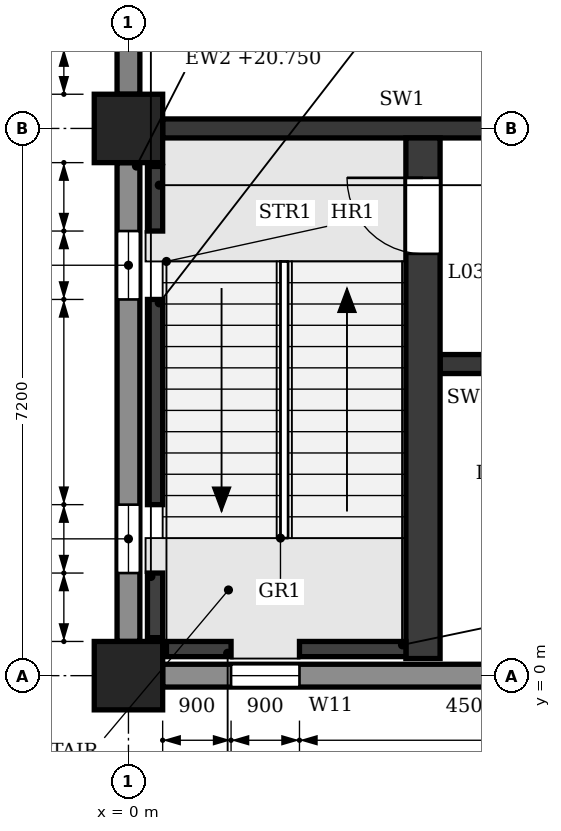
"""IFC4 building model, lengths in metres.
Left out: names, types, materials, properties, quantities, classifications, styles, units other than length and angle.
Written with IfcOpenShell. Run it as: python <this file> out.ifc"""

import sys

from ifc_helpers import new_model, si_unit, direction, frame, frame_2d, origin, origin_2d, place, context, subcontext, project, spatial, polyline, rectangle, outline, extrude, element, fill, save


model = new_model("IFC4")
c1 = context("Model", 3, precision=1e-05, world=origin(), true_north=direction((0.0, 1.0)))
c2 = subcontext(c1, "Body", "Model", "MODEL_VIEW")
j1 = project(units=[si_unit("LENGTHUNIT", "METRE"), si_unit("PLANEANGLEUNIT", "RADIAN")], contexts=[c1])
p1 = place(None, origin())
s1 = spatial("IfcSite", under=j1, at=p1, CompositionType="ELEMENT")
p2 = place(p1, origin())
s2 = spatial("IfcBuilding", under=s1, at=p2, CompositionType="ELEMENT")
p3 = place(p2, frame((0.0, 0.0, 16.8)))
s3 = spatial("IfcBuildingStorey", under=s2, at=p3, CompositionType="ELEMENT", Elevation=16.8)
for number, where, z_axis, x_axis in (
    (1, (0.0, 0.0, 0.0), (0.0, 0.0, 1.0), (1.0, 0.0, 0.0)),
    (2, (0.0, 7.2, 0.0), (0.0, 0.0, 1.0), (1.0, 0.0, 0.0)),
):
    element("IfcColumn", number, at=place(p3, frame(where, z_axis=z_axis, x_axis=x_axis)), inside=s3, PredefinedType="COLUMN", context=c2, shape_type="SweptSolid", body=[
        extrude(rectangle(XDim=0.9, YDim=0.9, at=origin_2d()), origin(), (0.0, 0.0, 1.0), 4.8),
    ])
p4 = place(p3, frame((0.0, 0.45, 0.0), z_axis=(0.0, 0.0, 1.0), x_axis=(0.0, 1.0, 0.0)))
e3 = element("IfcWall", 3, at=p4, inside=s3, PredefinedType="STANDARD", context=c2, shape_type="SweptSolid", body=[
    extrude(rectangle(XDim=6.3, YDim=0.3, at=frame_2d((3.15, 0.0))), origin(), (0.0, 0.0, 1.0), 3.95),
])
p5 = place(p4, frame((0.9, 0.0, 0.9)))
e4 = element("IfcOpeningElement", 4, at=p5, cuts=e3, PredefinedType="OPENING", context=c2, shape_type="SweptSolid", body=[
    extrude(outline(polyline([(0.0, 0.0), (0.9, 0.0), (0.9, 2.05), (0.45, 2.5), (0.0, 2.05), (0.0, 0.0)])), frame((0.0, 0.16, 0.0), z_axis=(0.0, -1.0, 0.0), x_axis=(1.0, 0.0, 0.0)), (0.0, 0.0, 1.0), 0.32),
])
p6 = place(p4, frame((4.5, 0.0, 0.9)))
e5 = element("IfcOpeningElement", 5, at=p6, cuts=e3, PredefinedType="OPENING", context=c2, shape_type="SweptSolid", body=[
    extrude(outline(polyline([(0.0, 0.0), (0.9, 0.0), (0.9, 2.05), (0.45, 2.5), (0.0, 2.05), (0.0, 0.0)])), frame((0.0, 0.16, 0.0), z_axis=(0.0, -1.0, 0.0), x_axis=(1.0, 0.0, 0.0)), (0.0, 0.0, 1.0), 0.32),
])
p7 = place(p3, frame((0.0, 7.65, 0.0), z_axis=(0.0, 0.0, 1.0), x_axis=(0.0, 1.0, 0.0)))
e6 = element("IfcWall", 6, at=p7, inside=s3, PredefinedType="STANDARD", context=c2, shape_type="SweptSolid", body=[
    extrude(rectangle(XDim=6.3, YDim=0.3, at=frame_2d((3.15, 0.0))), origin(), (0.0, 0.0, 1.0), 3.95),
])
p8 = place(p7, frame((0.6, 0.0, 0.9)))
e7 = element("IfcOpeningElement", 7, at=p8, cuts=e6, PredefinedType="OPENING", context=c2, shape_type="SweptSolid", body=[
    extrude(outline(polyline([(0.0, 0.0), (1.5, 0.0), (1.5, 1.75), (0.75, 2.5), (0.0, 1.75), (0.0, 0.0)])), frame((0.0, 0.16, 0.0), z_axis=(0.0, -1.0, 0.0), x_axis=(1.0, 0.0, 0.0)), (0.0, 0.0, 1.0), 0.32),
])
p9 = place(p7, frame((4.2, 0.0, 0.9)))
e8 = element("IfcOpeningElement", 8, at=p9, cuts=e6, PredefinedType="OPENING", context=c2, shape_type="SweptSolid", body=[
    extrude(outline(polyline([(0.0, 0.0), (1.5, 0.0), (1.5, 1.75), (0.75, 2.5), (0.0, 1.75), (0.0, 0.0)])), frame((0.0, 0.16, 0.0), z_axis=(0.0, -1.0, 0.0), x_axis=(1.0, 0.0, 0.0)), (0.0, 0.0, 1.0), 0.32),
])
p10 = place(p3, frame((0.45, 0.0, 0.0), z_axis=(0.0, 0.0, 1.0), x_axis=(1.0, 0.0, 0.0)))
e9 = element("IfcWall", 9, at=p10, inside=s3, PredefinedType="STANDARD", context=c2, shape_type="SweptSolid", body=[
    extrude(rectangle(XDim=6.3, YDim=0.3, at=frame_2d((3.15, 0.0))), origin(), (0.0, 0.0, 1.0), 3.95),
])
p11 = place(p10, frame((0.9, 0.0, 0.9)))
e10 = element("IfcOpeningElement", 10, at=p11, cuts=e9, PredefinedType="OPENING", context=c2, shape_type="SweptSolid", body=[
    extrude(outline(polyline([(0.0, 0.0), (0.9, 0.0), (0.9, 2.05), (0.45, 2.5), (0.0, 2.05), (0.0, 0.0)])), frame((0.0, 0.16, 0.0), z_axis=(0.0, -1.0, 0.0), x_axis=(1.0, 0.0, 0.0)), (0.0, 0.0, 1.0), 0.32),
])
p12 = place(p3, frame((0.45, 7.2, 0.0), z_axis=(0.0, 0.0, 1.0), x_axis=(1.0, 0.0, 0.0)))
e11 = element("IfcWall", 11, at=p12, inside=s3, PredefinedType="SHEAR", context=c2, shape_type="SweptSolid", body=[
    extrude(rectangle(XDim=6.3, YDim=0.25, at=frame_2d((3.15, 0.0))), origin(), (0.0, 0.0, 1.0), 3.8),
])
p13 = place(p12, frame((4.8, 0.0, 0.0)))
e12 = element("IfcOpeningElement", 12, at=p13, cuts=e11, PredefinedType="OPENING", context=c2, shape_type="SweptSolid", body=[
    extrude(rectangle(XDim=1.1, YDim=2.1, at=frame_2d((0.55, 1.05))), frame((0.0, 0.135, 0.0), z_axis=(0.0, -1.0, 0.0), x_axis=(1.0, 0.0, 0.0)), (0.0, 0.0, 1.0), 0.27),
])
p14 = place(p3, frame((0.35, 0.5, -0.25), z_axis=(0.0, 0.0, 1.0), x_axis=(0.0, 1.0, 0.0)))
e13 = element("IfcWall", 13, at=p14, inside=s3, PredefinedType="SHEAR", context=c2, shape_type="SweptSolid", body=[
    extrude(rectangle(XDim=0.85, YDim=0.2, at=frame_2d((0.425, 0.0))), origin(), (0.0, 0.0, 1.0), 4.8),
])
p15 = place(p3, frame((0.35, 2.25, -0.25), z_axis=(0.0, 0.0, 1.0), x_axis=(0.0, 1.0, 0.0)))
e14 = element("IfcWall", 14, at=p15, inside=s3, PredefinedType="SHEAR", context=c2, shape_type="SweptSolid", body=[
    extrude(rectangle(XDim=2.7, YDim=0.2, at=frame_2d((1.35, 0.0))), origin(), (0.0, 0.0, 1.0), 4.8),
])
p16 = place(p3, frame((0.35, 5.85, -0.25), z_axis=(0.0, 0.0, 1.0), x_axis=(0.0, 1.0, 0.0)))
e15 = element("IfcWall", 15, at=p16, inside=s3, PredefinedType="SHEAR", context=c2, shape_type="SweptSolid", body=[
    extrude(rectangle(XDim=0.85, YDim=0.2, at=frame_2d((0.425, 0.0))), origin(), (0.0, 0.0, 1.0), 4.8),
])
p17 = place(p3, frame((0.5, 0.35, -0.25), z_axis=(0.0, 0.0, 1.0), x_axis=(1.0, 0.0, 0.0)))
e16 = element("IfcWall", 16, at=p17, inside=s3, PredefinedType="SHEAR", context=c2, shape_type="SweptSolid", body=[
    extrude(rectangle(XDim=0.85, YDim=0.2, at=frame_2d((0.425, 0.0))), origin(), (0.0, 0.0, 1.0), 4.8),
])
p18 = place(p3, frame((2.25, 0.35, -0.25), z_axis=(0.0, 0.0, 1.0), x_axis=(1.0, 0.0, 0.0)))
e17 = element("IfcWall", 17, at=p18, inside=s3, PredefinedType="SHEAR", context=c2, shape_type="SweptSolid", body=[
    extrude(rectangle(XDim=1.4, YDim=0.2, at=frame_2d((0.7, 0.0))), origin(), (0.0, 0.0, 1.0), 4.8),
])
p19 = place(p3, frame((3.875, 0.225, 0.0), z_axis=(0.0, 0.0, 1.0), x_axis=(0.0, 1.0, 0.0)))
e18 = element("IfcWall", 18, at=p19, inside=s3, PredefinedType="SHEAR", context=c2, shape_type="SweptSolid", body=[
    extrude(rectangle(XDim=6.85, YDim=0.45, at=frame_2d((3.425, 0.0))), origin(), (0.0, 0.0, 1.0), 4.55),
])
p20 = place(p19, frame((5.325, 0.0, 0.0)))
e19 = element("IfcOpeningElement", 19, at=p20, cuts=e18, PredefinedType="OPENING", context=c2, shape_type="SweptSolid", body=[
    extrude(rectangle(XDim=1.0, YDim=2.1, at=frame_2d((0.5, 1.05))), frame((0.0, 0.235, 0.0), z_axis=(0.0, -1.0, 0.0), x_axis=(1.0, 0.0, 0.0)), (0.0, 0.0, 1.0), 0.47),
])
p21 = place(p3, frame((4.1, 4.1, 0.0), z_axis=(0.0, 0.0, 1.0), x_axis=(1.0, 0.0, 0.0)))
e20 = element("IfcWall", 20, at=p21, inside=s3, PredefinedType="SHEAR", context=c2, shape_type="SweptSolid", body=[
    extrude(rectangle(XDim=2.975, YDim=0.25, at=frame_2d((1.487, 0.0))), origin(), (0.0, 0.0, 1.0), 4.55),
])
p22 = place(p21, frame((0.55, 0.0, 0.0)))
e21 = element("IfcOpeningElement", 21, at=p22, cuts=e20, PredefinedType="OPENING", context=c2, shape_type="SweptSolid", body=[
    extrude(rectangle(XDim=0.9, YDim=2.1, at=frame_2d((0.45, 1.05))), frame((0.0, 0.135, 0.0), z_axis=(0.0, -1.0, 0.0), x_axis=(1.0, 0.0, 0.0)), (0.0, 0.0, 1.0), 0.27),
])
p23 = place(p11, origin())
e22 = element("IfcWindow", 22, at=p23, inside=s3, PartitioningType="SINGLE_PANEL", PredefinedType="WINDOW", context=c2, shape_type="SweptSolid", body=[
    extrude(outline(polyline([(0.0, 0.0), (0.9, 0.0), (0.9, 2.05), (0.45, 2.5), (0.0, 2.05), (0.0, 0.0)])), frame((0.0, 0.03, 0.0), z_axis=(0.0, -1.0, 0.0), x_axis=(1.0, 0.0, 0.0)), (0.0, 0.0, 1.0), 0.06),
])
fill(e10, e22)
p24 = place(p5, origin())
e23 = element("IfcWindow", 23, at=p24, inside=s3, PartitioningType="SINGLE_PANEL", PredefinedType="WINDOW", context=c2, shape_type="SweptSolid", body=[
    extrude(outline(polyline([(0.0, 0.0), (0.9, 0.0), (0.9, 2.05), (0.45, 2.5), (0.0, 2.05), (0.0, 0.0)])), frame((0.0, 0.03, 0.0), z_axis=(0.0, -1.0, 0.0), x_axis=(1.0, 0.0, 0.0)), (0.0, 0.0, 1.0), 0.06),
])
fill(e4, e23)
p25 = place(p6, origin())
e24 = element("IfcWindow", 24, at=p25, inside=s3, PartitioningType="SINGLE_PANEL", PredefinedType="WINDOW", context=c2, shape_type="SweptSolid", body=[
    extrude(outline(polyline([(0.0, 0.0), (0.9, 0.0), (0.9, 2.05), (0.45, 2.5), (0.0, 2.05), (0.0, 0.0)])), frame((0.0, 0.03, 0.0), z_axis=(0.0, -1.0, 0.0), x_axis=(1.0, 0.0, 0.0)), (0.0, 0.0, 1.0), 0.06),
])
fill(e5, e24)
p26 = place(p20, origin())
e25 = element("IfcDoor", 25, at=p26, inside=s3, OperationType="SINGLE_SWING_RIGHT", PredefinedType="DOOR", context=c2, shape_type="SweptSolid", body=[
    extrude(rectangle(XDim=1.0, YDim=2.1, at=frame_2d((0.5, 1.05))), frame((0.0, 0.025, 0.0), z_axis=(0.0, -1.0, 0.0), x_axis=(1.0, 0.0, 0.0)), (0.0, 0.0, 1.0), 0.05),
])
fill(e19, e25)
save(model, sys.argv[1])
